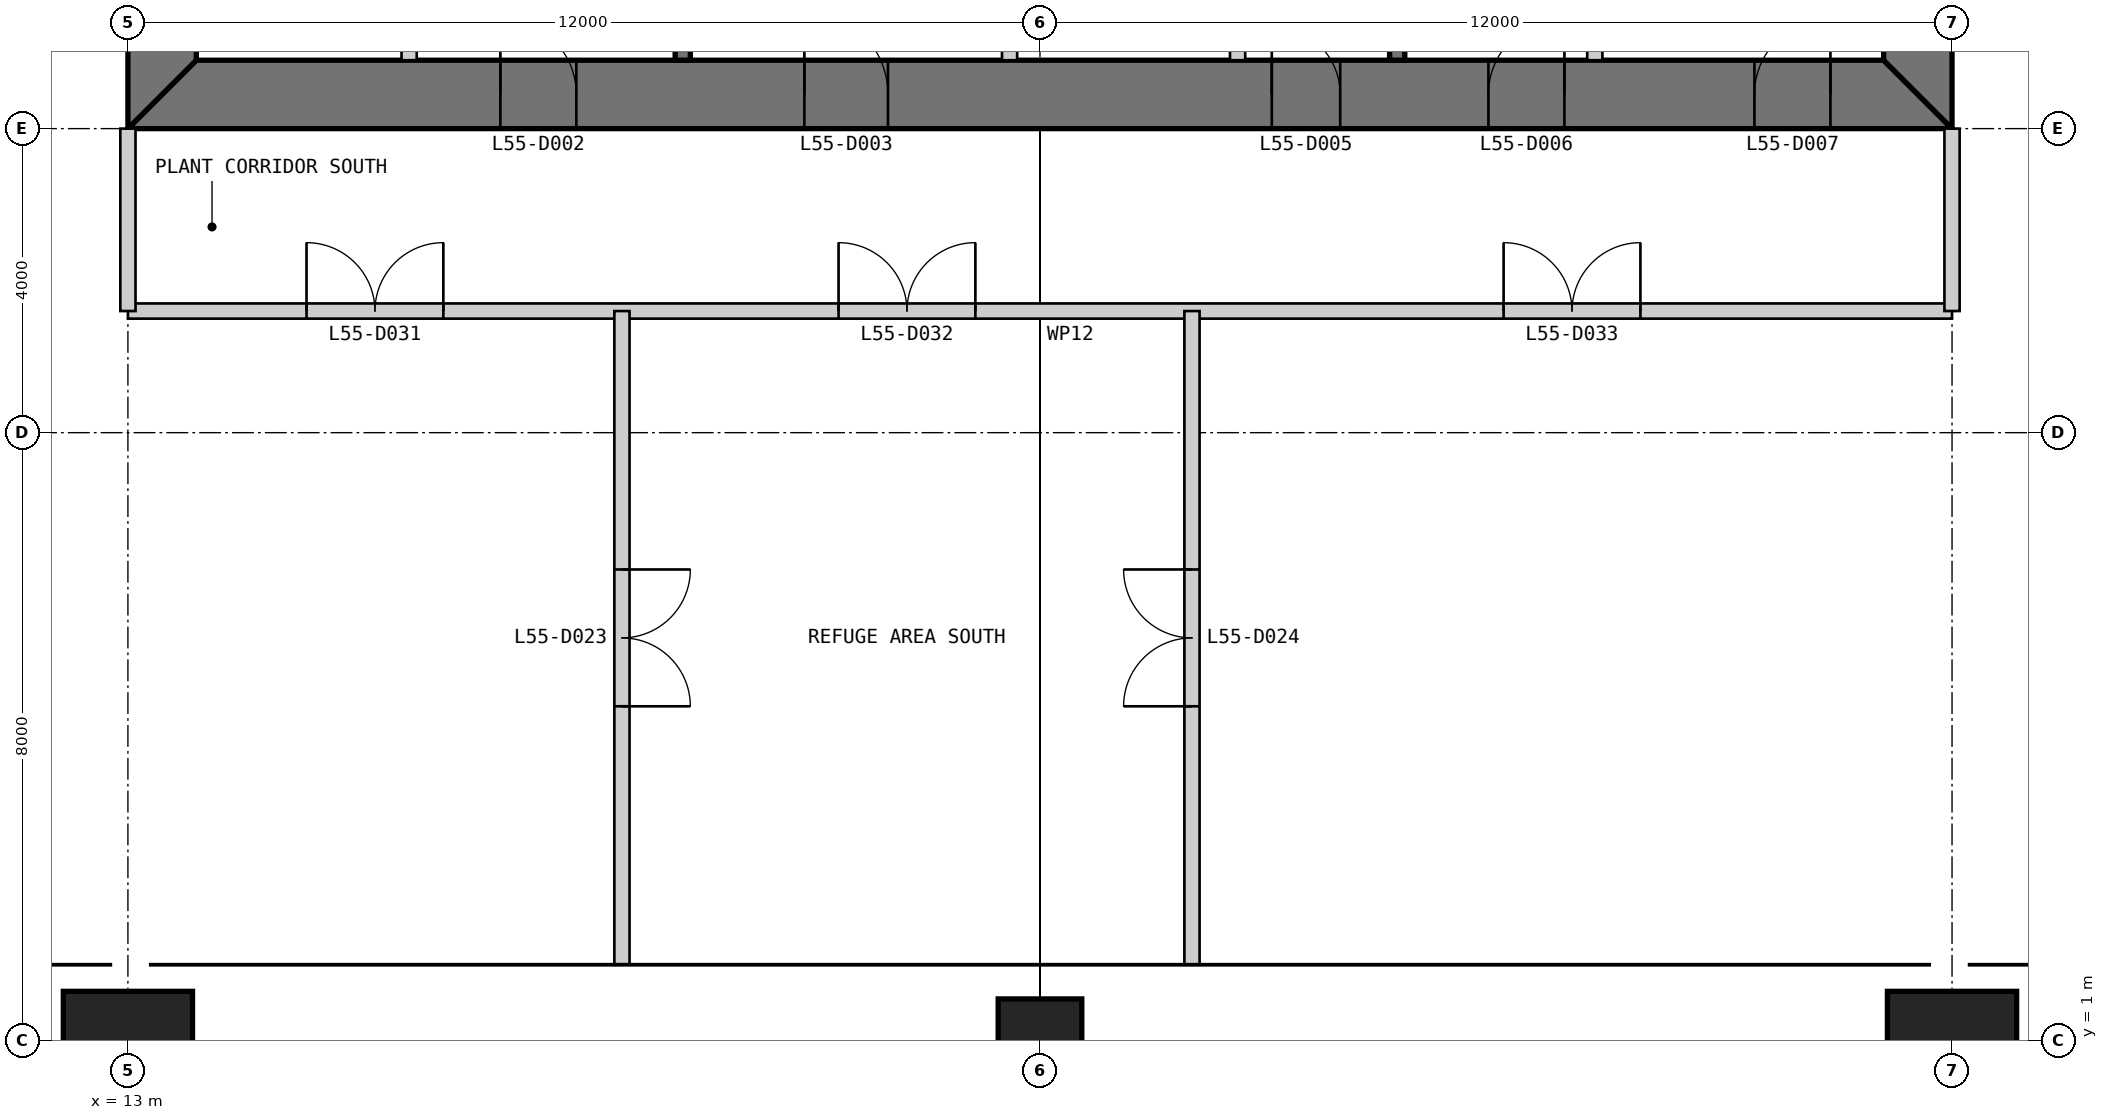
"""IFC4 building model, lengths in metres.
Left out: names, types, materials, properties, quantities, classifications, styles, units other than length and angle.
Written with IfcOpenShell. Run it as: python <this file> out.ifc"""

import sys

from ifc_helpers import new_model, si_unit, direction, frame, frame_2d, origin, origin_2d, place, context, subcontext, project, spatial, polyline, rectangle, outline, extrude, element, fill, save


model = new_model("IFC4")
c1 = context("Model", 3, precision=1e-05, world=origin(), true_north=direction((0.0, 1.0)))
c2 = subcontext(c1, "Body", "Model", "MODEL_VIEW")
j1 = project(units=[si_unit("LENGTHUNIT", "METRE"), si_unit("PLANEANGLEUNIT", "RADIAN")], contexts=[c1])
p1 = place(None, origin())
s1 = spatial("IfcSite", under=j1, at=p1, CompositionType="ELEMENT")
p2 = place(p1, origin())
s2 = spatial("IfcBuilding", under=s1, at=p2, CompositionType="ELEMENT")
p3 = place(p2, frame((0.0, 0.0, 233.8)))
s3 = spatial("IfcBuildingStorey", under=s2, at=p3, CompositionType="ELEMENT", Elevation=233.8)
p4 = place(p3, frame((13.0, 1.0, 0.0), z_axis=(0.0, 0.0, 1.0), x_axis=(1.0, 0.0, 0.0)))
e1 = element("IfcColumn", 1, at=p4, inside=s3, PredefinedType="COLUMN", context=c2, shape_type="SweptSolid", body=[
    extrude(rectangle(XDim=1.7, YDim=1.3, at=origin_2d()), origin(), (0.0, 0.0, 1.0), 6.0),
])
p5 = place(p3, frame((25.0, 1.0, 0.0), z_axis=(0.0, 0.0, 1.0), x_axis=(1.0, 0.0, 0.0)))
e2 = element("IfcColumn", 2, at=p5, inside=s3, PredefinedType="COLUMN", context=c2, shape_type="SweptSolid", body=[
    extrude(rectangle(XDim=1.1, YDim=1.1, at=origin_2d()), origin(), (0.0, 0.0, 1.0), 6.0),
])
p6 = place(p3, frame((37.0, 1.0, 0.0), z_axis=(0.0, 0.0, 1.0), x_axis=(1.0, 0.0, 0.0)))
e3 = element("IfcColumn", 3, at=p6, inside=s3, PredefinedType="COLUMN", context=c2, shape_type="SweptSolid", body=[
    extrude(rectangle(XDim=1.7, YDim=1.3, at=origin_2d()), origin(), (0.0, 0.0, 1.0), 6.0),
])
p7 = place(p3, frame((13.0, 13.45, 0.0), z_axis=(0.0, 0.0, 1.0), x_axis=(1.0, 0.0, 0.0)))
e4 = element("IfcWall", 4, at=p7, inside=s3, PredefinedType="SHEAR", context=c2, shape_type="SweptSolid", body=[
    extrude(outline(polyline([(0.0, -0.45), (24.0, -0.45), (23.1, 0.45), (0.9, 0.45), (0.0, -0.45)])), origin(), (0.0, 0.0, 1.0), 6.0),
])
p8 = place(p7, frame((4.9, 0.0, 0.0)))
e5 = element("IfcOpeningElement", 5, at=p8, cuts=e4, PredefinedType="OPENING", context=c2, shape_type="SweptSolid", body=[
    extrude(rectangle(XDim=1.0, YDim=2.2, at=frame_2d((0.5, 1.1))), frame((0.0, 0.46, 0.0), z_axis=(0.0, -1.0, 0.0), x_axis=(1.0, 0.0, 0.0)), (0.0, 0.0, 1.0), 0.92),
])
p9 = place(p7, frame((8.9, 0.0, 0.0)))
e6 = element("IfcOpeningElement", 6, at=p9, cuts=e4, PredefinedType="OPENING", context=c2, shape_type="SweptSolid", body=[
    extrude(rectangle(XDim=1.1, YDim=2.2, at=frame_2d((0.55, 1.1))), frame((0.0, 0.46, 0.0), z_axis=(0.0, -1.0, 0.0), x_axis=(1.0, 0.0, 0.0)), (0.0, 0.0, 1.0), 0.92),
])
p10 = place(p7, frame((15.05, 0.0, 0.0)))
e7 = element("IfcOpeningElement", 7, at=p10, cuts=e4, PredefinedType="OPENING", context=c2, shape_type="SweptSolid", body=[
    extrude(rectangle(XDim=0.9, YDim=2.2, at=frame_2d((0.45, 1.1))), frame((0.0, 0.46, 0.0), z_axis=(0.0, -1.0, 0.0), x_axis=(1.0, 0.0, 0.0)), (0.0, 0.0, 1.0), 0.92),
])
p11 = place(p7, frame((17.9, 0.0, 0.0)))
e8 = element("IfcOpeningElement", 8, at=p11, cuts=e4, PredefinedType="OPENING", context=c2, shape_type="SweptSolid", body=[
    extrude(rectangle(XDim=1.0, YDim=2.2, at=frame_2d((0.5, 1.1))), frame((0.0, 0.46, 0.0), z_axis=(0.0, -1.0, 0.0), x_axis=(1.0, 0.0, 0.0)), (0.0, 0.0, 1.0), 0.92),
])
p12 = place(p7, frame((21.4, 0.0, 0.0)))
e9 = element("IfcOpeningElement", 9, at=p12, cuts=e4, PredefinedType="OPENING", context=c2, shape_type="SweptSolid", body=[
    extrude(rectangle(XDim=1.0, YDim=2.2, at=frame_2d((0.5, 1.1))), frame((0.0, 0.46, 0.0), z_axis=(0.0, -1.0, 0.0), x_axis=(1.0, 0.0, 0.0)), (0.0, 0.0, 1.0), 0.92),
])
p13 = place(p3, frame((36.55, 13.9, 0.0), z_axis=(0.0, 0.0, 1.0), x_axis=(0.0, 1.0, 0.0)))
e10 = element("IfcWall", 10, at=p13, inside=s3, PredefinedType="SHEAR", context=c2, shape_type="SweptSolid", body=[
    extrude(outline(polyline([(-0.9, -0.45), (23.1, -0.45), (22.2, 0.45), (0.0, 0.45), (-0.9, -0.45)])), origin(), (0.0, 0.0, 1.0), 6.0),
])
p14 = place(p13, frame((20.2, 0.0, 0.0)))
e11 = element("IfcOpeningElement", 11, at=p14, cuts=e10, PredefinedType="OPENING", context=c2, shape_type="SweptSolid", body=[
    extrude(rectangle(XDim=1.0, YDim=2.2, at=frame_2d((0.5, 1.1))), frame((0.0, 0.46, 0.0), z_axis=(0.0, -1.0, 0.0), x_axis=(1.0, 0.0, 0.0)), (0.0, 0.0, 1.0), 0.92),
])
p15 = place(p13, frame((17.25, 0.0, 0.0)))
e12 = element("IfcOpeningElement", 12, at=p15, cuts=e10, PredefinedType="OPENING", context=c2, shape_type="SweptSolid", body=[
    extrude(rectangle(XDim=0.9, YDim=2.2, at=frame_2d((0.45, 1.1))), frame((0.0, 0.46, 0.0), z_axis=(0.0, -1.0, 0.0), x_axis=(1.0, 0.0, 0.0)), (0.0, 0.0, 1.0), 0.92),
])
p16 = place(p3, frame((13.45, 36.1, 0.0), z_axis=(0.0, 0.0, 1.0), x_axis=(0.0, -1.0, 0.0)))
e13 = element("IfcWall", 13, at=p16, inside=s3, PredefinedType="SHEAR", context=c2, shape_type="SweptSolid", body=[
    extrude(outline(polyline([(-0.9, -0.45), (23.1, -0.45), (22.2, 0.45), (0.0, 0.45), (-0.9, -0.45)])), origin(), (0.0, 0.0, 1.0), 6.0),
])
p17 = place(p16, frame((20.2, 0.0, 0.0)))
e14 = element("IfcOpeningElement", 14, at=p17, cuts=e13, PredefinedType="OPENING", context=c2, shape_type="SweptSolid", body=[
    extrude(rectangle(XDim=1.0, YDim=2.2, at=frame_2d((0.5, 1.1))), frame((0.0, 0.46, 0.0), z_axis=(0.0, -1.0, 0.0), x_axis=(1.0, 0.0, 0.0)), (0.0, 0.0, 1.0), 0.92),
])
p18 = place(p16, frame((17.25, 0.0, 0.0)))
e15 = element("IfcOpeningElement", 15, at=p18, cuts=e13, PredefinedType="OPENING", context=c2, shape_type="SweptSolid", body=[
    extrude(rectangle(XDim=0.9, YDim=2.2, at=frame_2d((0.45, 1.1))), frame((0.0, 0.46, 0.0), z_axis=(0.0, -1.0, 0.0), x_axis=(1.0, 0.0, 0.0)), (0.0, 0.0, 1.0), 0.92),
])
p19 = place(p3, frame((16.7, 13.9, 0.0), z_axis=(0.0, 0.0, 1.0), x_axis=(0.0, 1.0, 0.0)))
e16 = element("IfcWall", 16, at=p19, inside=s3, PredefinedType="PARTITIONING", context=c2, shape_type="SweptSolid", body=[
    extrude(rectangle(XDim=16.1, YDim=0.2, at=frame_2d((8.05, 0.0))), origin(), (0.0, 0.0, 1.0), 5.8),
])
p20 = place(p19, frame((7.95, 0.0, 0.0)))
e17 = element("IfcOpeningElement", 17, at=p20, cuts=e16, PredefinedType="OPENING", context=c2, shape_type="SweptSolid", body=[
    extrude(rectangle(XDim=0.9, YDim=2.2, at=frame_2d((0.45, 1.1))), frame((0.0, 0.11, 0.0), z_axis=(0.0, -1.0, 0.0), x_axis=(1.0, 0.0, 0.0)), (0.0, 0.0, 1.0), 0.22),
])
p21 = place(p19, frame((13.3, 0.0, 0.0)))
e18 = element("IfcOpeningElement", 18, at=p21, cuts=e16, PredefinedType="OPENING", context=c2, shape_type="SweptSolid", body=[
    extrude(rectangle(XDim=0.9, YDim=2.2, at=frame_2d((0.45, 1.1))), frame((0.0, 0.11, 0.0), z_axis=(0.0, -1.0, 0.0), x_axis=(1.0, 0.0, 0.0)), (0.0, 0.0, 1.0), 0.22),
])
p22 = place(p3, frame((20.3, 13.9, 0.0), z_axis=(0.0, 0.0, 1.0), x_axis=(0.0, 1.0, 0.0)))
e19 = element("IfcWall", 19, at=p22, inside=s3, PredefinedType="SOLIDWALL", context=c2, shape_type="SweptSolid", body=[
    extrude(rectangle(XDim=16.1, YDim=0.2, at=frame_2d((8.05, 0.0))), origin(), (0.0, 0.0, 1.0), 5.8),
])
p23 = place(p22, frame((7.9, 0.0, 0.0)))
e20 = element("IfcOpeningElement", 20, at=p23, cuts=e19, PredefinedType="OPENING", context=c2, shape_type="SweptSolid", body=[
    extrude(rectangle(XDim=0.9, YDim=2.2, at=frame_2d((0.45, 1.1))), frame((0.0, 0.11, 0.0), z_axis=(0.0, -1.0, 0.0), x_axis=(1.0, 0.0, 0.0)), (0.0, 0.0, 1.0), 0.22),
])
p24 = place(p22, frame((12.9, 0.0, 0.0)))
e21 = element("IfcOpeningElement", 21, at=p24, cuts=e19, PredefinedType="OPENING", context=c2, shape_type="SweptSolid", body=[
    extrude(rectangle(XDim=0.9, YDim=2.2, at=frame_2d((0.45, 1.1))), frame((0.0, 0.11, 0.0), z_axis=(0.0, -1.0, 0.0), x_axis=(1.0, 0.0, 0.0)), (0.0, 0.0, 1.0), 0.22),
])
p25 = place(p3, frame((24.6, 13.9, 0.0), z_axis=(0.0, 0.0, 1.0), x_axis=(0.0, 1.0, 0.0)))
e22 = element("IfcWall", 22, at=p25, inside=s3, PredefinedType="PARTITIONING", context=c2, shape_type="SweptSolid", body=[
    extrude(rectangle(XDim=3.3, YDim=0.2, at=frame_2d((1.65, 0.0))), origin(), (0.0, 0.0, 1.0), 5.8),
])
p26 = place(p25, frame((0.9, 0.0, 0.0)))
e23 = element("IfcOpeningElement", 23, at=p26, cuts=e22, PredefinedType="OPENING", context=c2, shape_type="SweptSolid", body=[
    extrude(rectangle(XDim=1.1, YDim=2.2, at=frame_2d((0.55, 1.1))), frame((0.0, 0.11, 0.0), z_axis=(0.0, -1.0, 0.0), x_axis=(1.0, 0.0, 0.0)), (0.0, 0.0, 1.0), 0.22),
])
p27 = place(p3, frame((27.6, 13.9, 0.0), z_axis=(0.0, 0.0, 1.0), x_axis=(0.0, 1.0, 0.0)))
e24 = element("IfcWall", 24, at=p27, inside=s3, PredefinedType="PARTITIONING", context=c2, shape_type="SweptSolid", body=[
    extrude(rectangle(XDim=3.3, YDim=0.2, at=frame_2d((1.65, 0.0))), origin(), (0.0, 0.0, 1.0), 5.8),
])
p28 = place(p3, frame((29.7, 13.9, 0.0), z_axis=(0.0, 0.0, 1.0), x_axis=(0.0, 1.0, 0.0)))
e25 = element("IfcWall", 25, at=p28, inside=s3, PredefinedType="SOLIDWALL", context=c2, shape_type="SweptSolid", body=[
    extrude(rectangle(XDim=6.1, YDim=0.2, at=frame_2d((3.05, 0.0))), origin(), (0.0, 0.0, 1.0), 5.8),
])
p29 = place(p3, frame((32.3, 13.9, 0.0), z_axis=(0.0, 0.0, 1.0), x_axis=(0.0, 1.0, 0.0)))
e26 = element("IfcWall", 26, at=p29, inside=s3, PredefinedType="PARTITIONING", context=c2, shape_type="SweptSolid", body=[
    extrude(rectangle(XDim=6.1, YDim=0.2, at=frame_2d((3.05, 0.0))), origin(), (0.0, 0.0, 1.0), 5.8),
])
p30 = place(p3, frame((13.0, 10.6, 0.0), z_axis=(0.0, 0.0, 1.0), x_axis=(1.0, 0.0, 0.0)))
e27 = element("IfcWall", 27, at=p30, inside=s3, PredefinedType="PARTITIONING", context=c2, shape_type="SweptSolid", body=[
    extrude(rectangle(XDim=24.0, YDim=0.2, at=frame_2d((12.0, 0.0))), origin(), (0.0, 0.0, 1.0), 5.8),
])
p31 = place(p30, frame((2.35, 0.0, 0.0)))
e28 = element("IfcOpeningElement", 28, at=p31, cuts=e27, PredefinedType="OPENING", context=c2, shape_type="SweptSolid", body=[
    extrude(rectangle(XDim=1.8, YDim=2.4, at=frame_2d((0.9, 1.2))), frame((0.0, 0.11, 0.0), z_axis=(0.0, -1.0, 0.0), x_axis=(1.0, 0.0, 0.0)), (0.0, 0.0, 1.0), 0.22),
])
p32 = place(p30, frame((9.35, 0.0, 0.0)))
e29 = element("IfcOpeningElement", 29, at=p32, cuts=e27, PredefinedType="OPENING", context=c2, shape_type="SweptSolid", body=[
    extrude(rectangle(XDim=1.8, YDim=2.4, at=frame_2d((0.9, 1.2))), frame((0.0, 0.11, 0.0), z_axis=(0.0, -1.0, 0.0), x_axis=(1.0, 0.0, 0.0)), (0.0, 0.0, 1.0), 0.22),
])
p33 = place(p30, frame((18.1, 0.0, 0.0)))
e30 = element("IfcOpeningElement", 30, at=p33, cuts=e27, PredefinedType="OPENING", context=c2, shape_type="SweptSolid", body=[
    extrude(rectangle(XDim=1.8, YDim=2.4, at=frame_2d((0.9, 1.2))), frame((0.0, 0.11, 0.0), z_axis=(0.0, -1.0, 0.0), x_axis=(1.0, 0.0, 0.0)), (0.0, 0.0, 1.0), 0.22),
])
for number, where, z_axis, x_axis in (
    (31, (13.0, 10.6, 0.0), (0.0, 0.0, 1.0), (0.0, 1.0, 0.0)),
    (32, (37.0, 10.6, 0.0), (0.0, 0.0, 1.0), (0.0, 1.0, 0.0)),
):
    element("IfcWall", number, at=place(p3, frame(where, z_axis=z_axis, x_axis=x_axis)), inside=s3, PredefinedType="PARTITIONING", context=c2, shape_type="SweptSolid", body=[
        extrude(rectangle(XDim=2.4, YDim=0.2, at=frame_2d((1.2, 0.0))), origin(), (0.0, 0.0, 1.0), 4.705),
    ])
p34 = place(p3, frame((19.5, 2.0, 0.0), z_axis=(0.0, 0.0, 1.0), x_axis=(0.0, 1.0, 0.0)))
e33 = element("IfcWall", 33, at=p34, inside=s3, PredefinedType="PARTITIONING", context=c2, shape_type="SweptSolid", body=[
    extrude(rectangle(XDim=8.6, YDim=0.2, at=frame_2d((4.3, 0.0))), origin(), (0.0, 0.0, 1.0), 5.8),
])
p35 = place(p34, frame((3.4, 0.0, 0.0)))
e34 = element("IfcOpeningElement", 34, at=p35, cuts=e33, PredefinedType="OPENING", context=c2, shape_type="SweptSolid", body=[
    extrude(rectangle(XDim=1.8, YDim=2.4, at=frame_2d((0.9, 1.2))), frame((0.0, 0.11, 0.0), z_axis=(0.0, -1.0, 0.0), x_axis=(1.0, 0.0, 0.0)), (0.0, 0.0, 1.0), 0.22),
])
p36 = place(p3, frame((27.0, 2.0, 0.0), z_axis=(0.0, 0.0, 1.0), x_axis=(0.0, 1.0, 0.0)))
e35 = element("IfcWall", 35, at=p36, inside=s3, PredefinedType="PARTITIONING", context=c2, shape_type="SweptSolid", body=[
    extrude(rectangle(XDim=8.6, YDim=0.2, at=frame_2d((4.3, 0.0))), origin(), (0.0, 0.0, 1.0), 5.8),
])
p37 = place(p36, frame((3.4, 0.0, 0.0)))
e36 = element("IfcOpeningElement", 36, at=p37, cuts=e35, PredefinedType="OPENING", context=c2, shape_type="SweptSolid", body=[
    extrude(rectangle(XDim=1.8, YDim=2.4, at=frame_2d((0.9, 1.2))), frame((0.0, 0.11, 0.0), z_axis=(0.0, -1.0, 0.0), x_axis=(1.0, 0.0, 0.0)), (0.0, 0.0, 1.0), 0.22),
])
p38 = place(p8, origin())
e37 = element("IfcDoor", 37, at=p38, inside=s3, OperationType="SINGLE_SWING_LEFT", PredefinedType="DOOR", context=c2, shape_type="SweptSolid", body=[
    extrude(rectangle(XDim=1.0, YDim=2.2, at=frame_2d((0.5, 1.1))), frame((0.0, 0.025, 0.0), z_axis=(0.0, -1.0, 0.0), x_axis=(1.0, 0.0, 0.0)), (0.0, 0.0, 1.0), 0.05),
    extrude(outline(polyline([(0.0, 0.0), (0.04, 0.0), (0.04, 2.16), (0.96, 2.16), (0.96, 0.0), (1.0, 0.0), (1.0, 2.2), (0.0, 2.2), (0.0, 0.0)])), frame((0.0, 0.3, 0.0), z_axis=(0.0, -1.0, 0.0), x_axis=(1.0, 0.0, 0.0)), (0.0, 0.0, 1.0), 0.6),
])
fill(e5, e37)
p39 = place(p9, origin())
e38 = element("IfcDoor", 38, at=p39, inside=s3, OperationType="SINGLE_SWING_LEFT", PredefinedType="DOOR", context=c2, shape_type="SweptSolid", body=[
    extrude(rectangle(XDim=1.1, YDim=2.2, at=frame_2d((0.55, 1.1))), frame((0.0, 0.025, 0.0), z_axis=(0.0, -1.0, 0.0), x_axis=(1.0, 0.0, 0.0)), (0.0, 0.0, 1.0), 0.05),
    extrude(outline(polyline([(0.0, 0.0), (0.04, 0.0), (0.04, 2.16), (1.06, 2.16), (1.06, 0.0), (1.1, 0.0), (1.1, 2.2), (0.0, 2.2), (0.0, 0.0)])), frame((0.0, 0.3, 0.0), z_axis=(0.0, -1.0, 0.0), x_axis=(1.0, 0.0, 0.0)), (0.0, 0.0, 1.0), 0.6),
])
fill(e6, e38)
p40 = place(p10, origin())
e39 = element("IfcDoor", 39, at=p40, inside=s3, OperationType="SINGLE_SWING_LEFT", PredefinedType="DOOR", context=c2, shape_type="SweptSolid", body=[
    extrude(rectangle(XDim=0.9, YDim=2.2, at=frame_2d((0.45, 1.1))), frame((0.0, 0.025, 0.0), z_axis=(0.0, -1.0, 0.0), x_axis=(1.0, 0.0, 0.0)), (0.0, 0.0, 1.0), 0.05),
    extrude(outline(polyline([(0.0, 0.0), (0.04, 0.0), (0.04, 2.16), (0.86, 2.16), (0.86, 0.0), (0.9, 0.0), (0.9, 2.2), (0.0, 2.2), (0.0, 0.0)])), frame((0.0, 0.3, 0.0), z_axis=(0.0, -1.0, 0.0), x_axis=(1.0, 0.0, 0.0)), (0.0, 0.0, 1.0), 0.6),
])
fill(e7, e39)
p41 = place(p11, origin())
e40 = element("IfcDoor", 40, at=p41, inside=s3, OperationType="SINGLE_SWING_RIGHT", PredefinedType="DOOR", context=c2, shape_type="SweptSolid", body=[
    extrude(rectangle(XDim=1.0, YDim=2.2, at=frame_2d((0.5, 1.1))), frame((0.0, 0.025, 0.0), z_axis=(0.0, -1.0, 0.0), x_axis=(1.0, 0.0, 0.0)), (0.0, 0.0, 1.0), 0.05),
    extrude(outline(polyline([(0.0, 0.0), (0.04, 0.0), (0.04, 2.16), (0.96, 2.16), (0.96, 0.0), (1.0, 0.0), (1.0, 2.2), (0.0, 2.2), (0.0, 0.0)])), frame((0.0, 0.3, 0.0), z_axis=(0.0, -1.0, 0.0), x_axis=(1.0, 0.0, 0.0)), (0.0, 0.0, 1.0), 0.6),
])
fill(e8, e40)
p42 = place(p12, origin())
e41 = element("IfcDoor", 41, at=p42, inside=s3, OperationType="SINGLE_SWING_RIGHT", PredefinedType="DOOR", context=c2, shape_type="SweptSolid", body=[
    extrude(rectangle(XDim=1.0, YDim=2.2, at=frame_2d((0.5, 1.1))), frame((0.0, 0.025, 0.0), z_axis=(0.0, -1.0, 0.0), x_axis=(1.0, 0.0, 0.0)), (0.0, 0.0, 1.0), 0.05),
    extrude(outline(polyline([(0.0, 0.0), (0.04, 0.0), (0.04, 2.16), (0.96, 2.16), (0.96, 0.0), (1.0, 0.0), (1.0, 2.2), (0.0, 2.2), (0.0, 0.0)])), frame((0.0, 0.3, 0.0), z_axis=(0.0, -1.0, 0.0), x_axis=(1.0, 0.0, 0.0)), (0.0, 0.0, 1.0), 0.6),
])
fill(e9, e41)
p43 = place(p35, frame((1.8, 0.0, 0.0), z_axis=(0.0, 0.0, 1.0), x_axis=(-1.0, 0.0, 0.0)))
e42 = element("IfcDoor", 42, at=p43, inside=s3, OperationType="DOUBLE_DOOR_SINGLE_SWING", PredefinedType="DOOR", context=c2, shape_type="SweptSolid", body=[
    extrude(rectangle(XDim=1.8, YDim=2.4, at=frame_2d((0.9, 1.2))), frame((0.0, 0.025, 0.0), z_axis=(0.0, -1.0, 0.0), x_axis=(1.0, 0.0, 0.0)), (0.0, 0.0, 1.0), 0.05),
])
fill(e34, e42)
p44 = place(p37, origin())
e43 = element("IfcDoor", 43, at=p44, inside=s3, OperationType="DOUBLE_DOOR_SINGLE_SWING", PredefinedType="DOOR", context=c2, shape_type="SweptSolid", body=[
    extrude(rectangle(XDim=1.8, YDim=2.4, at=frame_2d((0.9, 1.2))), frame((0.0, 0.025, 0.0), z_axis=(0.0, -1.0, 0.0), x_axis=(1.0, 0.0, 0.0)), (0.0, 0.0, 1.0), 0.05),
])
fill(e36, e43)
p45 = place(p31, origin())
e44 = element("IfcDoor", 44, at=p45, inside=s3, OperationType="DOUBLE_DOOR_SINGLE_SWING", PredefinedType="DOOR", context=c2, shape_type="SweptSolid", body=[
    extrude(rectangle(XDim=1.8, YDim=2.4, at=frame_2d((0.9, 1.2))), frame((0.0, 0.025, 0.0), z_axis=(0.0, -1.0, 0.0), x_axis=(1.0, 0.0, 0.0)), (0.0, 0.0, 1.0), 0.05),
])
fill(e28, e44)
p46 = place(p32, origin())
e45 = element("IfcDoor", 45, at=p46, inside=s3, OperationType="DOUBLE_DOOR_SINGLE_SWING", PredefinedType="DOOR", context=c2, shape_type="SweptSolid", body=[
    extrude(rectangle(XDim=1.8, YDim=2.4, at=frame_2d((0.9, 1.2))), frame((0.0, 0.025, 0.0), z_axis=(0.0, -1.0, 0.0), x_axis=(1.0, 0.0, 0.0)), (0.0, 0.0, 1.0), 0.05),
])
fill(e29, e45)
p47 = place(p33, origin())
e46 = element("IfcDoor", 46, at=p47, inside=s3, OperationType="DOUBLE_DOOR_SINGLE_SWING", PredefinedType="DOOR", context=c2, shape_type="SweptSolid", body=[
    extrude(rectangle(XDim=1.8, YDim=2.4, at=frame_2d((0.9, 1.2))), frame((0.0, 0.025, 0.0), z_axis=(0.0, -1.0, 0.0), x_axis=(1.0, 0.0, 0.0)), (0.0, 0.0, 1.0), 0.05),
])
fill(e30, e46)
save(model, sys.argv[1])
